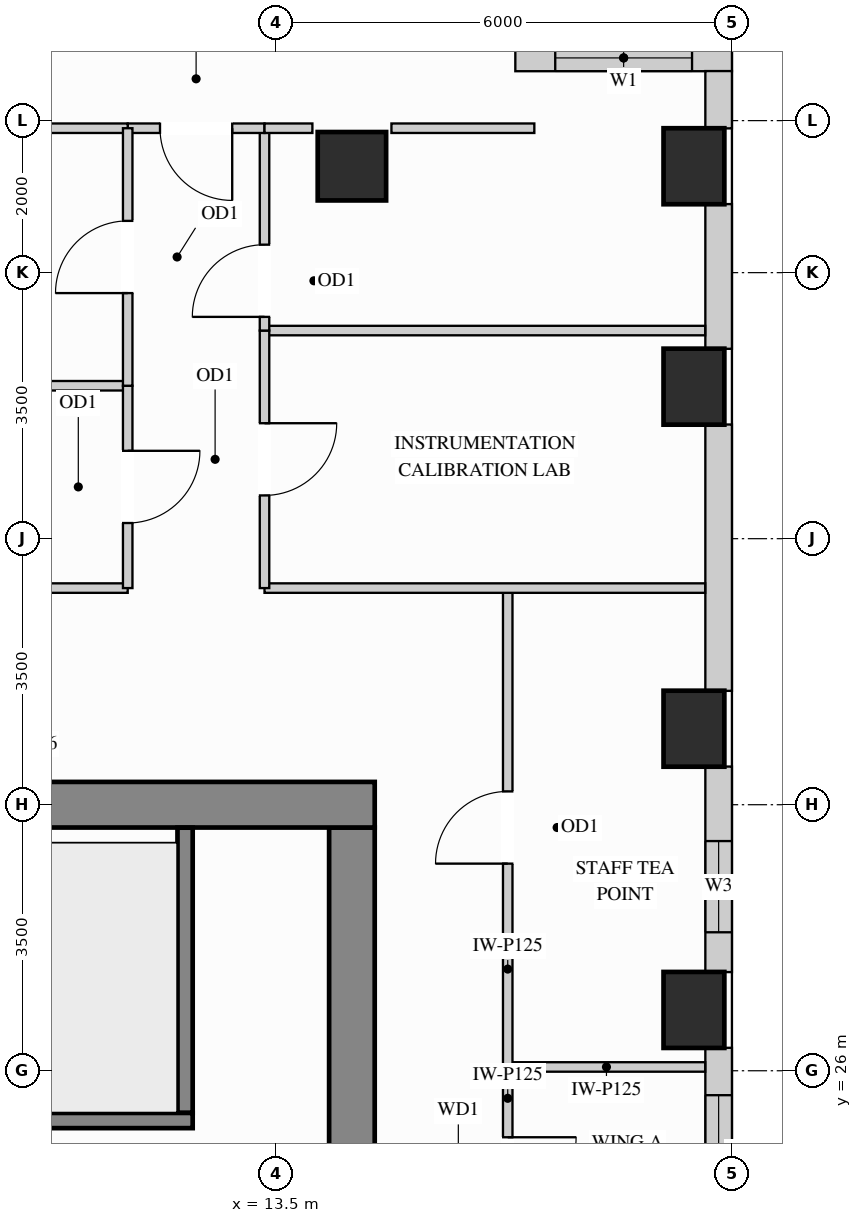
"""IFC4 building model, lengths in metres.
Left out: names, types, materials, properties, quantities, classifications, styles, units other than length and angle.
Written with IfcOpenShell. Run it as: python <this file> out.ifc"""

import sys

from ifc_helpers import new_model, si_unit, direction, frame, frame_2d, origin, origin_2d, place, context, subcontext, project, spatial, rectangle, extrude, source, transform, mapped, element, fill, save


model = new_model("IFC4")
c1 = context("Model", 3, precision=1e-05, world=origin(), true_north=direction((0.0, 1.0)))
c2 = subcontext(c1, "Body", "Model", "MODEL_VIEW")
j1 = project(units=[si_unit("LENGTHUNIT", "METRE"), si_unit("PLANEANGLEUNIT", "RADIAN")], contexts=[c1])
p1 = place(None, origin())
s1 = spatial("IfcSite", under=j1, at=p1, CompositionType="ELEMENT")
p2 = place(p1, origin())
s2 = spatial("IfcBuilding", under=s1, at=p2, CompositionType="ELEMENT")
p3 = place(p2, frame((0.0, 0.0, 161.1)))
s3 = spatial("IfcBuildingStorey", under=s2, at=p3, CompositionType="ELEMENT", Elevation=161.1)
m1 = source(origin(), c2, "Body", "SweptSolid", [
    extrude(rectangle(XDim=0.9, YDim=0.9, at=origin_2d()), origin(), (0.0, 0.0, 1.0), 3.4),
])
p4 = place(p3, frame((14.5, 37.9, 0.0), z_axis=(0.0, 0.0, 1.0), x_axis=(1.0, 0.0, 0.0)))
e1 = element("IfcColumn", 1, at=p4, inside=s3, PredefinedType="COLUMN", context=c2, shape_type="MappedRepresentation", body=[
    mapped(m1, transform((0.0, 0.0, 0.0), x_axis=(1.0, 0.0, 0.0), y_axis=(0.0, 1.0, 0.0), z_axis=(0.0, 0.0, 1.0))),
])
m2 = source(origin(), c2, "Body", "SweptSolid", [
    extrude(rectangle(XDim=0.8, YDim=1.0, at=origin_2d()), origin(), (0.0, 0.0, 1.0), 3.4),
])
for number, where, z_axis, x_axis in (
    (2, (19.0, 26.8, 0.0), (0.0, 0.0, 1.0), (1.0, 0.0, 0.0)),
    (3, (19.0, 30.5, 0.0), (0.0, 0.0, 1.0), (1.0, 0.0, 0.0)),
    (4, (19.0, 35.0, 0.0), (0.0, 0.0, 1.0), (1.0, 0.0, 0.0)),
    (5, (19.0, 37.9, 0.0), (0.0, 0.0, 1.0), (1.0, 0.0, 0.0)),
):
    element("IfcColumn", number, at=place(p3, frame(where, z_axis=z_axis, x_axis=x_axis)), inside=s3, PredefinedType="COLUMN", context=c2, shape_type="MappedRepresentation", body=[
        mapped(m2, transform((0.0, 0.0, 0.0), x_axis=(1.0, 0.0, 0.0), y_axis=(0.0, 1.0, 0.0), z_axis=(0.0, 0.0, 1.0))),
    ])
m3 = source(origin(), c2, "Body", "SweptSolid", [
    extrude(rectangle(XDim=8.32, YDim=0.6, at=frame_2d((4.16, 0.0))), origin(), (0.0, 0.0, 1.0), 3.4),
])
p5 = place(p3, frame((14.5, 20.88, 0.0), z_axis=(0.0, 0.0, 1.0), x_axis=(0.0, 1.0, 0.0)))
e6 = element("IfcWall", 6, at=p5, inside=s3, PredefinedType="SHEAR", context=c2, shape_type="MappedRepresentation", body=[
    mapped(m3, transform((0.0, 0.0, 0.0), x_axis=(1.0, 0.0, 0.0), y_axis=(0.0, 1.0, 0.0), z_axis=(0.0, 0.0, 1.0))),
])
m4 = source(origin(), c2, "Body", "SweptSolid", [
    extrude(rectangle(XDim=10.6, YDim=0.6, at=frame_2d((5.3, 0.0))), origin(), (0.0, 0.0, 1.0), 3.4),
])
p6 = place(p3, frame((4.2, 29.5, 0.0), z_axis=(0.0, 0.0, 1.0), x_axis=(1.0, 0.0, 0.0)))
e7 = element("IfcWall", 7, at=p6, inside=s3, PredefinedType="SHEAR", context=c2, shape_type="MappedRepresentation", body=[
    mapped(m4, transform((0.0, 0.0, 0.0), x_axis=(1.0, 0.0, 0.0), y_axis=(0.0, 1.0, 0.0), z_axis=(0.0, 0.0, 1.0))),
])
p7 = place(p3, frame((19.5, 39.325, 0.0), z_axis=(0.0, 0.0, 1.0), x_axis=(-1.0, 0.0, 0.0)))
e8 = element("IfcWall", 8, at=p7, inside=s3, PredefinedType="SOLIDWALL", context=c2, shape_type="SweptSolid", body=[
    extrude(rectangle(XDim=2.85, YDim=0.35, at=frame_2d((1.425, 0.0))), origin(), (0.0, 0.0, 1.0), 3.385),
])
p8 = place(p7, frame((0.525, 0.0, 0.78)))
e9 = element("IfcOpeningElement", 9, at=p8, cuts=e8, PredefinedType="OPENING", context=c2, shape_type="SweptSolid", body=[
    extrude(rectangle(XDim=1.8, YDim=2.1, at=frame_2d((0.9, 1.05))), frame((0.0, 0.185, 0.0), z_axis=(0.0, -1.0, 0.0), x_axis=(1.0, 0.0, 0.0)), (0.0, 0.0, 1.0), 0.37),
])
p9 = place(p3, frame((19.325, 22.998, 0.0), z_axis=(0.0, 0.0, 1.0), x_axis=(0.0, 1.0, 0.0)))
e10 = element("IfcWall", 10, at=p9, inside=s3, PredefinedType="SOLIDWALL", context=c2, shape_type="SweptSolid", body=[
    extrude(rectangle(XDim=3.304, YDim=0.35, at=frame_2d((1.652, 0.0))), origin(), (0.0, 0.0, 1.0), 2.612),
])
p10 = place(p9, frame((1.18, 0.0, 0.78)))
e11 = element("IfcOpeningElement", 11, at=p10, cuts=e10, PredefinedType="OPENING", context=c2, shape_type="SweptSolid", body=[
    extrude(rectangle(XDim=1.5, YDim=1.652, at=frame_2d((0.75, 0.826))), frame((0.0, 0.185, 0.0), z_axis=(0.0, -1.0, 0.0), x_axis=(1.0, 0.0, 0.0)), (0.0, 0.0, 1.0), 0.37),
])
p11 = place(p3, frame((19.325, 27.298, 0.0), z_axis=(0.0, 0.0, 1.0), x_axis=(0.0, 1.0, 0.0)))
e12 = element("IfcWall", 12, at=p11, inside=s3, PredefinedType="SOLIDWALL", context=c2, shape_type="SweptSolid", body=[
    extrude(rectangle(XDim=2.704, YDim=0.35, at=frame_2d((1.352, 0.0))), origin(), (0.0, 0.0, 1.0), 2.612),
])
p12 = place(p11, frame((0.524, 0.0, 0.78)))
e13 = element("IfcOpeningElement", 13, at=p12, cuts=e12, PredefinedType="OPENING", context=c2, shape_type="SweptSolid", body=[
    extrude(rectangle(XDim=1.2, YDim=1.652, at=frame_2d((0.6, 0.826))), frame((0.0, 0.185, 0.0), z_axis=(0.0, -1.0, 0.0), x_axis=(1.0, 0.0, 0.0)), (0.0, 0.0, 1.0), 0.37),
])
m5 = source(origin(), c2, "Body", "SweptSolid", [
    extrude(rectangle(XDim=3.504, YDim=0.35, at=frame_2d((1.752, 0.0))), origin(), (0.0, 0.0, 1.0), 2.612),
])
p13 = place(p3, frame((19.325, 30.998, 0.0), z_axis=(0.0, 0.0, 1.0), x_axis=(0.0, 1.0, 0.0)))
e14 = element("IfcWall", 14, at=p13, inside=s3, PredefinedType="SOLIDWALL", context=c2, shape_type="MappedRepresentation", body=[
    mapped(m5, transform((0.0, 0.0, 0.0), x_axis=(1.0, 0.0, 0.0), y_axis=(0.0, 1.0, 0.0), z_axis=(0.0, 0.0, 1.0))),
])
m6 = source(origin(), c2, "Body", "SweptSolid", [
    extrude(rectangle(XDim=1.904, YDim=0.35, at=frame_2d((0.952, 0.0))), origin(), (0.0, 0.0, 1.0), 2.612),
])
p14 = place(p3, frame((19.325, 35.498, 0.0), z_axis=(0.0, 0.0, 1.0), x_axis=(0.0, 1.0, 0.0)))
e15 = element("IfcWall", 15, at=p14, inside=s3, PredefinedType="SOLIDWALL", context=c2, shape_type="MappedRepresentation", body=[
    mapped(m6, transform((0.0, 0.0, 0.0), x_axis=(1.0, 0.0, 0.0), y_axis=(0.0, 1.0, 0.0), z_axis=(0.0, 0.0, 1.0))),
])
m7 = source(origin(), c2, "Body", "SweptSolid", [
    extrude(rectangle(XDim=0.754, YDim=0.35, at=frame_2d((0.377, 0.0))), origin(), (0.0, 0.0, 1.0), 3.385),
])
p15 = place(p3, frame((19.325, 38.398, 0.0), z_axis=(0.0, 0.0, 1.0), x_axis=(0.0, 1.0, 0.0)))
e16 = element("IfcWall", 16, at=p15, inside=s3, PredefinedType="SOLIDWALL", context=c2, shape_type="MappedRepresentation", body=[
    mapped(m7, transform((0.0, 0.0, 0.0), x_axis=(1.0, 0.0, 0.0), y_axis=(0.0, 1.0, 0.0), z_axis=(0.0, 0.0, 1.0))),
])
m8 = source(origin(), c2, "Body", "SweptSolid", [
    extrude(rectangle(XDim=2.598, YDim=0.125, at=frame_2d((1.299, 0.0))), origin(), (0.0, 0.0, 1.0), 3.385),
])
p16 = place(p3, frame((16.55, 26.05, 0.0), z_axis=(0.0, 0.0, 1.0), x_axis=(1.0, 0.0, 0.0)))
e17 = element("IfcWall", 17, at=p16, inside=s3, PredefinedType="PARTITIONING", context=c2, shape_type="MappedRepresentation", body=[
    mapped(m8, transform((0.0, 0.0, 0.0), x_axis=(1.0, 0.0, 0.0), y_axis=(0.0, 1.0, 0.0), z_axis=(0.0, 0.0, 1.0))),
])
p17 = place(p3, frame((16.55, 26.05, 0.0), z_axis=(0.0, 0.0, 1.0), x_axis=(0.0, 1.0, 0.0)))
e18 = element("IfcWall", 18, at=p17, inside=s3, PredefinedType="PARTITIONING", context=c2, shape_type="SweptSolid", body=[
    extrude(rectangle(XDim=6.3, YDim=0.125, at=frame_2d((3.15, 0.0))), origin(), (0.0, 0.0, 1.0), 3.385),
])
p18 = place(p17, frame((2.675, 0.0, 0.0)))
e19 = element("IfcOpeningElement", 19, at=p18, cuts=e18, PredefinedType="OPENING", context=c2, shape_type="SweptSolid", body=[
    extrude(rectangle(XDim=0.95, YDim=2.15, at=frame_2d((0.475, 1.075))), frame((0.0, 0.073, 0.0), z_axis=(0.0, -1.0, 0.0), x_axis=(1.0, 0.0, 0.0)), (0.0, 0.0, 1.0), 0.145),
])
p19 = place(p3, frame((16.55, 23.35, 0.0), z_axis=(0.0, 0.0, 1.0), x_axis=(0.0, 1.0, 0.0)))
e20 = element("IfcWall", 20, at=p19, inside=s3, PredefinedType="PARTITIONING", context=c2, shape_type="SweptSolid", body=[
    extrude(rectangle(XDim=2.7, YDim=0.125, at=frame_2d((1.35, 0.0))), origin(), (0.0, 0.0, 1.0), 3.385),
])
p20 = place(p19, frame((0.875, 0.0, 0.0)))
e21 = element("IfcOpeningElement", 21, at=p20, cuts=e20, PredefinedType="OPENING", context=c2, shape_type="SweptSolid", body=[
    extrude(rectangle(XDim=0.9, YDim=2.15, at=frame_2d((0.45, 1.075))), frame((0.0, 0.073, 0.0), z_axis=(0.0, -1.0, 0.0), x_axis=(1.0, 0.0, 0.0)), (0.0, 0.0, 1.0), 0.145),
])
m9 = source(origin(), c2, "Body", "SweptSolid", [
    extrude(rectangle(XDim=5.798, YDim=0.125, at=frame_2d((2.899, 0.0))), origin(), (0.0, 0.0, 1.0), 3.385),
])
for number, where, z_axis, x_axis in (
    (22, (13.35, 35.738, 0.0), (0.0, 0.0, 1.0), (1.0, 0.0, 0.0)),
    (23, (13.35, 32.35, 0.0), (0.0, 0.0, 1.0), (1.0, 0.0, 0.0)),
):
    element("IfcWall", number, at=place(p3, frame(where, z_axis=z_axis, x_axis=x_axis)), inside=s3, PredefinedType="PARTITIONING", context=c2, shape_type="MappedRepresentation", body=[
        mapped(m9, transform((0.0, 0.0, 0.0), x_axis=(1.0, 0.0, 0.0), y_axis=(0.0, 1.0, 0.0), z_axis=(0.0, 0.0, 1.0))),
    ])
m10 = source(origin(), c2, "Body", "SweptSolid", [
    extrude(rectangle(XDim=11.198, YDim=0.125, at=frame_2d((5.599, 0.0))), origin(), (0.0, 0.0, 1.0), 3.385),
])
p21 = place(p3, frame((0.352, 32.35, 0.0), z_axis=(0.0, 0.0, 1.0), x_axis=(1.0, 0.0, 0.0)))
e24 = element("IfcWall", 24, at=p21, inside=s3, PredefinedType="PARTITIONING", context=c2, shape_type="MappedRepresentation", body=[
    mapped(m10, transform((0.0, 0.0, 0.0), x_axis=(1.0, 0.0, 0.0), y_axis=(0.0, 1.0, 0.0), z_axis=(0.0, 0.0, 1.0))),
])
m11 = source(origin(), c2, "Body", "SweptSolid", [
    extrude(rectangle(XDim=10.43, YDim=0.125, at=frame_2d((5.215, 0.0))), origin(), (0.0, 0.0, 1.0), 3.385),
])
p22 = place(p3, frame((1.12, 35.012, 0.0), z_axis=(0.0, 0.0, 1.0), x_axis=(1.0, 0.0, 0.0)))
e25 = element("IfcWall", 25, at=p22, inside=s3, PredefinedType="PARTITIONING", context=c2, shape_type="MappedRepresentation", body=[
    mapped(m11, transform((0.0, 0.0, 0.0), x_axis=(1.0, 0.0, 0.0), y_axis=(0.0, 1.0, 0.0), z_axis=(0.0, 0.0, 1.0))),
])
p23 = place(p3, frame((13.35, 32.35, 0.0), z_axis=(0.0, 0.0, 1.0), x_axis=(0.0, 1.0, 0.0)))
e26 = element("IfcWall", 26, at=p23, inside=s3, PredefinedType="PARTITIONING", context=c2, shape_type="SweptSolid", body=[
    extrude(rectangle(XDim=3.388, YDim=0.125, at=frame_2d((1.694, 0.0))), origin(), (0.0, 0.0, 1.0), 3.385),
])
p24 = place(p23, frame((1.219, 0.0, 0.0)))
e27 = element("IfcOpeningElement", 27, at=p24, cuts=e26, PredefinedType="OPENING", context=c2, shape_type="SweptSolid", body=[
    extrude(rectangle(XDim=0.95, YDim=2.15, at=frame_2d((0.475, 1.075))), frame((0.0, 0.073, 0.0), z_axis=(0.0, -1.0, 0.0), x_axis=(1.0, 0.0, 0.0)), (0.0, 0.0, 1.0), 0.145),
])
p25 = place(p3, frame((13.35, 35.738, 0.0), z_axis=(0.0, 0.0, 1.0), x_axis=(0.0, 1.0, 0.0)))
e28 = element("IfcWall", 28, at=p25, inside=s3, PredefinedType="PARTITIONING", context=c2, shape_type="SweptSolid", body=[
    extrude(rectangle(XDim=2.662, YDim=0.125, at=frame_2d((1.331, 0.0))), origin(), (0.0, 0.0, 1.0), 3.385),
])
p26 = place(p25, frame((0.18, 0.0, 0.0)))
e29 = element("IfcOpeningElement", 29, at=p26, cuts=e28, PredefinedType="OPENING", context=c2, shape_type="SweptSolid", body=[
    extrude(rectangle(XDim=0.95, YDim=2.15, at=frame_2d((0.475, 1.075))), frame((0.0, 0.073, 0.0), z_axis=(0.0, -1.0, 0.0), x_axis=(1.0, 0.0, 0.0)), (0.0, 0.0, 1.0), 0.145),
])
p27 = place(p3, frame((11.55, 38.4, 0.0), z_axis=(0.0, 0.0, 1.0), x_axis=(1.0, 0.0, 0.0)))
e30 = element("IfcWall", 30, at=p27, inside=s3, PredefinedType="PARTITIONING", context=c2, shape_type="SweptSolid", body=[
    extrude(rectangle(XDim=1.8, YDim=0.125, at=frame_2d((0.9, 0.0))), origin(), (0.0, 0.0, 1.0), 3.385),
])
p28 = place(p27, frame((0.425, 0.0, 0.0)))
e31 = element("IfcOpeningElement", 31, at=p28, cuts=e30, PredefinedType="OPENING", context=c2, shape_type="SweptSolid", body=[
    extrude(rectangle(XDim=0.95, YDim=2.15, at=frame_2d((0.475, 1.075))), frame((0.0, 0.073, 0.0), z_axis=(0.0, -1.0, 0.0), x_axis=(1.0, 0.0, 0.0)), (0.0, 0.0, 1.0), 0.145),
])
m12 = source(origin(), c2, "Body", "SweptSolid", [
    extrude(rectangle(XDim=0.63, YDim=0.125, at=frame_2d((0.315, 0.0))), origin(), (0.0, 0.0, 1.0), 3.385),
])
p29 = place(p3, frame((13.35, 38.4, 0.0), z_axis=(0.0, 0.0, 1.0), x_axis=(1.0, 0.0, 0.0)))
e32 = element("IfcWall", 32, at=p29, inside=s3, PredefinedType="PARTITIONING", context=c2, shape_type="MappedRepresentation", body=[
    mapped(m12, transform((0.0, 0.0, 0.0), x_axis=(1.0, 0.0, 0.0), y_axis=(0.0, 1.0, 0.0), z_axis=(0.0, 0.0, 1.0))),
])
m13 = source(origin(), c2, "Body", "SweptSolid", [
    extrude(rectangle(XDim=1.88, YDim=0.125, at=frame_2d((0.94, 0.0))), origin(), (0.0, 0.0, 1.0), 3.385),
])
p30 = place(p3, frame((15.02, 38.4, 0.0), z_axis=(0.0, 0.0, 1.0), x_axis=(1.0, 0.0, 0.0)))
e33 = element("IfcWall", 33, at=p30, inside=s3, PredefinedType="PARTITIONING", context=c2, shape_type="MappedRepresentation", body=[
    mapped(m13, transform((0.0, 0.0, 0.0), x_axis=(1.0, 0.0, 0.0), y_axis=(0.0, 1.0, 0.0), z_axis=(0.0, 0.0, 1.0))),
])
m14 = source(origin(), c2, "Body", "SweptSolid", [
    extrude(rectangle(XDim=2.03, YDim=0.125, at=frame_2d((1.015, 0.0))), origin(), (0.0, 0.0, 1.0), 3.385),
])
p31 = place(p3, frame((9.52, 38.4, 0.0), z_axis=(0.0, 0.0, 1.0), x_axis=(1.0, 0.0, 0.0)))
e34 = element("IfcWall", 34, at=p31, inside=s3, PredefinedType="PARTITIONING", context=c2, shape_type="MappedRepresentation", body=[
    mapped(m14, transform((0.0, 0.0, 0.0), x_axis=(1.0, 0.0, 0.0), y_axis=(0.0, 1.0, 0.0), z_axis=(0.0, 0.0, 1.0))),
])
p32 = place(p3, frame((11.55, 32.35, 0.0), z_axis=(0.0, 0.0, 1.0), x_axis=(0.0, 1.0, 0.0)))
e35 = element("IfcWall", 35, at=p32, inside=s3, PredefinedType="PARTITIONING", context=c2, shape_type="SweptSolid", body=[
    extrude(rectangle(XDim=2.662, YDim=0.125, at=frame_2d((1.331, 0.0))), origin(), (0.0, 0.0, 1.0), 3.385),
])
p33 = place(p32, frame((0.856, 0.0, 0.0)))
e36 = element("IfcOpeningElement", 36, at=p33, cuts=e35, PredefinedType="OPENING", context=c2, shape_type="SweptSolid", body=[
    extrude(rectangle(XDim=0.95, YDim=2.15, at=frame_2d((0.475, 1.075))), frame((0.0, 0.073, 0.0), z_axis=(0.0, -1.0, 0.0), x_axis=(1.0, 0.0, 0.0)), (0.0, 0.0, 1.0), 0.145),
])
p34 = place(p3, frame((11.55, 35.012, 0.0), z_axis=(0.0, 0.0, 1.0), x_axis=(0.0, 1.0, 0.0)))
e37 = element("IfcWall", 37, at=p34, inside=s3, PredefinedType="PARTITIONING", context=c2, shape_type="SweptSolid", body=[
    extrude(rectangle(XDim=3.388, YDim=0.125, at=frame_2d((1.694, 0.0))), origin(), (0.0, 0.0, 1.0), 3.385),
])
p35 = place(p34, frame((1.219, 0.0, 0.0)))
e38 = element("IfcOpeningElement", 38, at=p35, cuts=e37, PredefinedType="OPENING", context=c2, shape_type="SweptSolid", body=[
    extrude(rectangle(XDim=0.95, YDim=2.15, at=frame_2d((0.475, 1.075))), frame((0.0, 0.073, 0.0), z_axis=(0.0, -1.0, 0.0), x_axis=(1.0, 0.0, 0.0)), (0.0, 0.0, 1.0), 0.145),
])
m15 = source(origin(), c2, "Body", "SweptSolid", [
    extrude(rectangle(XDim=3.753, YDim=0.2, at=frame_2d((1.876, 0.0))), origin(), (0.0, 0.0, 1.0), 3.4),
])
p36 = place(p3, frame((12.305, 25.445, 0.0), z_axis=(0.0, 0.0, 1.0), x_axis=(0.0, 1.0, 0.0)))
e39 = element("IfcWall", 39, at=p36, inside=s3, PredefinedType="SHEAR", context=c2, shape_type="MappedRepresentation", body=[
    mapped(m15, transform((0.0, 0.0, 0.0), x_axis=(1.0, 0.0, 0.0), y_axis=(0.0, 1.0, 0.0), z_axis=(0.0, 0.0, 1.0))),
])
p37 = place(p3, frame((4.802, 25.345, 0.0), z_axis=(0.0, 0.0, 1.0), x_axis=(1.0, 0.0, 0.0)))
e40 = element("IfcWall", 40, at=p37, inside=s3, PredefinedType="SHEAR", context=c2, shape_type="SweptSolid", body=[
    extrude(rectangle(XDim=7.603, YDim=0.2, at=frame_2d((3.802, 0.0))), origin(), (0.0, 0.0, 1.0), 3.4),
])
p38 = place(p37, frame((0.4, 0.0, 0.0)))
e41 = element("IfcOpeningElement", 41, at=p38, cuts=e40, PredefinedType="OPENING", context=c2, shape_type="SweptSolid", body=[
    extrude(rectangle(XDim=1.1, YDim=2.15, at=frame_2d((0.55, 1.075))), frame((0.0, 0.11, 0.0), z_axis=(0.0, -1.0, 0.0), x_axis=(1.0, 0.0, 0.0)), (0.0, 0.0, 1.0), 0.22),
])
m16 = source(origin(), c2, "Body", "SweptSolid", [
    extrude(rectangle(XDim=0.95, YDim=2.15, at=frame_2d((0.475, 1.075))), frame((0.0, 0.025, 0.0), z_axis=(0.0, -1.0, 0.0), x_axis=(1.0, 0.0, 0.0)), (0.0, 0.0, 1.0), 0.05),
])
p39 = place(p18, origin())
e42 = element("IfcDoor", 42, at=p39, inside=s3, OperationType="SINGLE_SWING_LEFT", PredefinedType="DOOR", context=c2, shape_type="MappedRepresentation", body=[
    mapped(m16, transform((0.0, 0.0, 0.0), x_axis=(1.0, 0.0, 0.0), y_axis=(0.0, 1.0, 0.0), z_axis=(0.0, 0.0, 1.0))),
])
fill(e19, e42)
p40 = place(p24, origin())
e43 = element("IfcDoor", 43, at=p40, inside=s3, OperationType="SINGLE_SWING_RIGHT", PredefinedType="DOOR", context=c2, shape_type="MappedRepresentation", body=[
    mapped(m16, transform((0.0, 0.0, 0.0), x_axis=(1.0, 0.0, 0.0), y_axis=(0.0, 1.0, 0.0), z_axis=(0.0, 0.0, 1.0))),
])
fill(e27, e43)
p41 = place(p26, origin())
e44 = element("IfcDoor", 44, at=p41, inside=s3, OperationType="SINGLE_SWING_LEFT", PredefinedType="DOOR", context=c2, shape_type="MappedRepresentation", body=[
    mapped(m16, transform((0.0, 0.0, 0.0), x_axis=(1.0, 0.0, 0.0), y_axis=(0.0, 1.0, 0.0), z_axis=(0.0, 0.0, 1.0))),
])
fill(e29, e44)
p42 = place(p28, origin())
e45 = element("IfcDoor", 45, at=p42, inside=s3, OperationType="SINGLE_SWING_RIGHT", PredefinedType="DOOR", context=c2, shape_type="MappedRepresentation", body=[
    mapped(m16, transform((0.0, 0.0, 0.0), x_axis=(1.0, 0.0, 0.0), y_axis=(0.0, 1.0, 0.0), z_axis=(0.0, 0.0, 1.0))),
])
fill(e31, e45)
p43 = place(p33, origin())
e46 = element("IfcDoor", 46, at=p43, inside=s3, OperationType="SINGLE_SWING_RIGHT", PredefinedType="DOOR", context=c2, shape_type="MappedRepresentation", body=[
    mapped(m16, transform((0.0, 0.0, 0.0), x_axis=(1.0, 0.0, 0.0), y_axis=(0.0, 1.0, 0.0), z_axis=(0.0, 0.0, 1.0))),
])
fill(e36, e46)
p44 = place(p35, origin())
e47 = element("IfcDoor", 47, at=p44, inside=s3, OperationType="SINGLE_SWING_LEFT", PredefinedType="DOOR", context=c2, shape_type="MappedRepresentation", body=[
    mapped(m16, transform((0.0, 0.0, 0.0), x_axis=(1.0, 0.0, 0.0), y_axis=(0.0, 1.0, 0.0), z_axis=(0.0, 0.0, 1.0))),
])
fill(e38, e47)
m17 = source(origin(), c2, "Body", "SweptSolid", [
    extrude(rectangle(XDim=0.9, YDim=2.15, at=frame_2d((0.45, 1.075))), frame((0.0, 0.025, 0.0), z_axis=(0.0, -1.0, 0.0), x_axis=(1.0, 0.0, 0.0)), (0.0, 0.0, 1.0), 0.05),
])
p45 = place(p20, origin())
e48 = element("IfcDoor", 48, at=p45, inside=s3, OperationType="SINGLE_SWING_RIGHT", PredefinedType="DOOR", context=c2, shape_type="MappedRepresentation", body=[
    mapped(m17, transform((0.0, 0.0, 0.0), x_axis=(1.0, 0.0, 0.0), y_axis=(0.0, 1.0, 0.0), z_axis=(0.0, 0.0, 1.0))),
])
fill(e21, e48)
m18 = source(origin(), c2, "Body", "SweptSolid", [
    extrude(rectangle(XDim=1.8, YDim=2.1, at=frame_2d((0.9, 1.05))), frame((0.0, 0.03, 0.0), z_axis=(0.0, -1.0, 0.0), x_axis=(1.0, 0.0, 0.0)), (0.0, 0.0, 1.0), 0.06),
])
p46 = place(p8, origin())
e49 = element("IfcWindow", 49, at=p46, inside=s3, PartitioningType="SINGLE_PANEL", PredefinedType="WINDOW", context=c2, shape_type="MappedRepresentation", body=[
    mapped(m18, transform((0.0, 0.0, 0.0), x_axis=(1.0, 0.0, 0.0), y_axis=(0.0, 1.0, 0.0), z_axis=(0.0, 0.0, 1.0))),
])
fill(e9, e49)
m19 = source(origin(), c2, "Body", "SweptSolid", [
    extrude(rectangle(XDim=1.2, YDim=1.652, at=frame_2d((0.6, 0.826))), frame((0.0, 0.03, 0.0), z_axis=(0.0, -1.0, 0.0), x_axis=(1.0, 0.0, 0.0)), (0.0, 0.0, 1.0), 0.06),
])
p47 = place(p12, origin())
e50 = element("IfcWindow", 50, at=p47, inside=s3, PartitioningType="SINGLE_PANEL", PredefinedType="WINDOW", context=c2, shape_type="MappedRepresentation", body=[
    mapped(m19, transform((0.0, 0.0, 0.0), x_axis=(1.0, 0.0, 0.0), y_axis=(0.0, 1.0, 0.0), z_axis=(0.0, 0.0, 1.0))),
])
fill(e13, e50)
m20 = source(origin(), c2, "Body", "SweptSolid", [
    extrude(rectangle(XDim=1.5, YDim=1.652, at=frame_2d((0.75, 0.826))), frame((0.0, 0.03, 0.0), z_axis=(0.0, -1.0, 0.0), x_axis=(1.0, 0.0, 0.0)), (0.0, 0.0, 1.0), 0.06),
])
p48 = place(p10, origin())
e51 = element("IfcWindow", 51, at=p48, inside=s3, PartitioningType="SINGLE_PANEL", PredefinedType="WINDOW", context=c2, shape_type="MappedRepresentation", body=[
    mapped(m20, transform((0.0, 0.0, 0.0), x_axis=(1.0, 0.0, 0.0), y_axis=(0.0, 1.0, 0.0), z_axis=(0.0, 0.0, 1.0))),
])
fill(e11, e51)
save(model, sys.argv[1])
